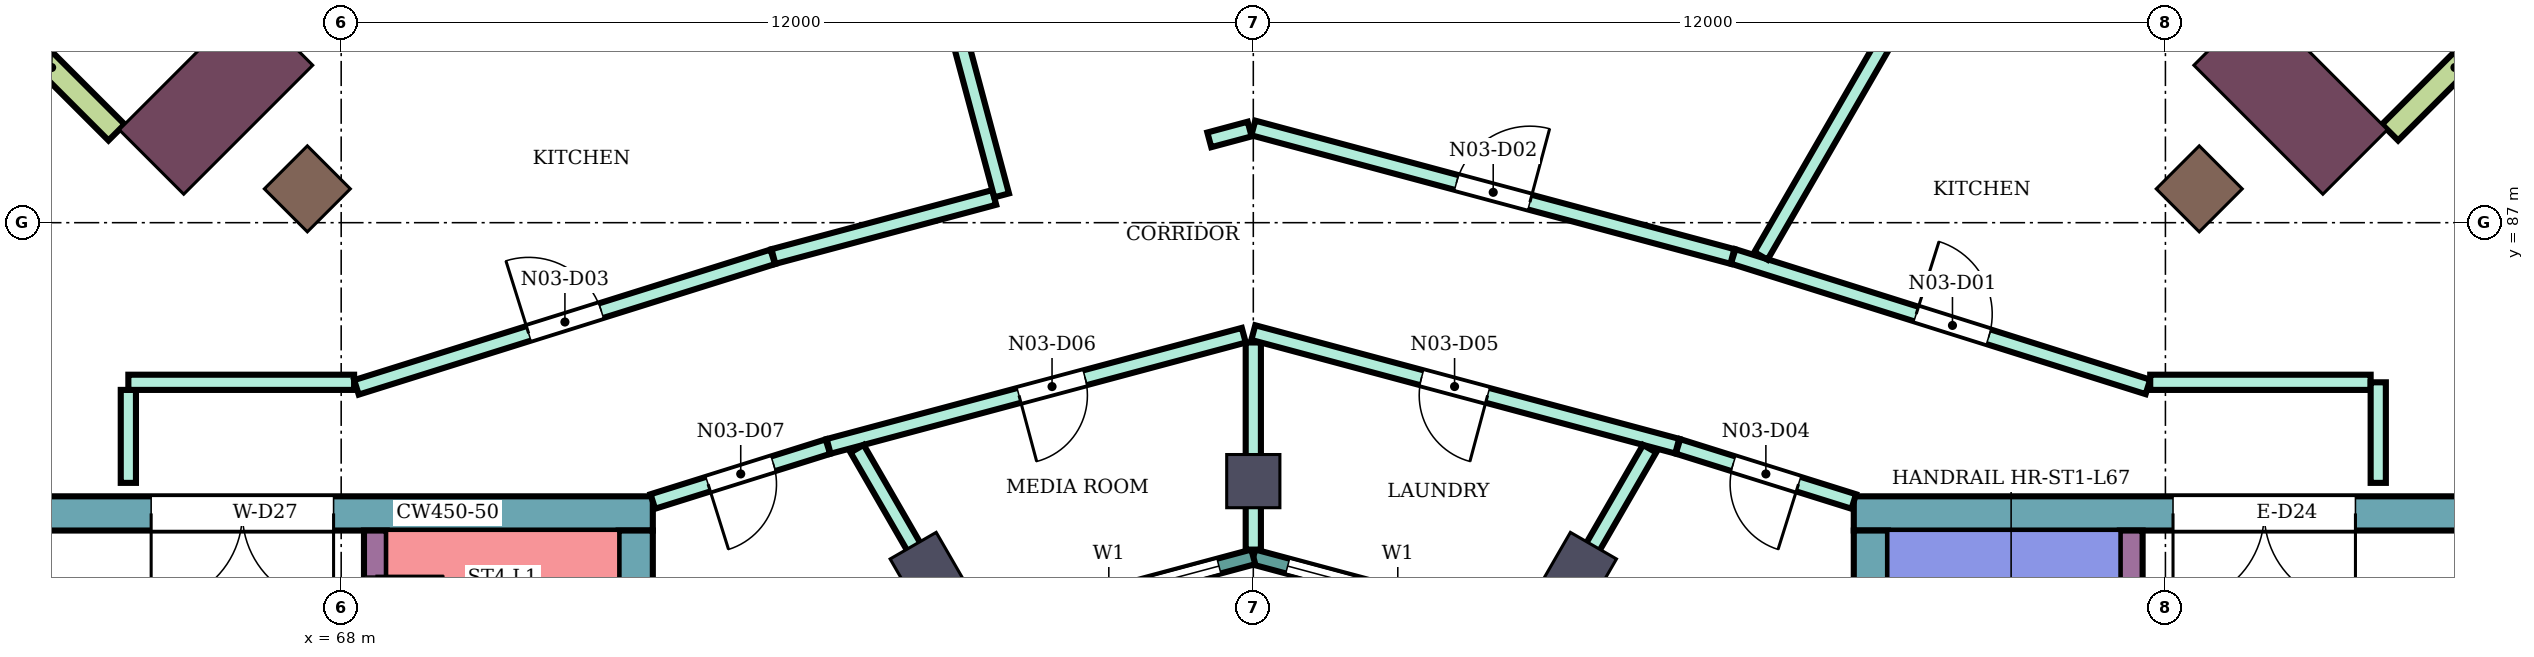
"""IFC4 building model, lengths in metres.
Left out: names, types, materials, properties, quantities, classifications, styles, units other than length and angle.
Written with IfcOpenShell. Run it as: python <this file> out.ifc"""

import sys

from ifc_helpers import new_model, si_unit, direction, frame, frame_2d, origin, origin_2d, place, context, subcontext, project, spatial, rectangle, extrude, element, fill, save


model = new_model("IFC4")
c1 = context("Model", 3, precision=1e-05, world=origin(), true_north=direction((0.0, 1.0)))
c2 = subcontext(c1, "Body", "Model", "MODEL_VIEW")
j1 = project(units=[si_unit("LENGTHUNIT", "METRE"), si_unit("PLANEANGLEUNIT", "RADIAN")], contexts=[c1])
p1 = place(None, origin())
s1 = spatial("IfcSite", under=j1, at=p1, CompositionType="ELEMENT")
p2 = place(p1, origin())
s2 = spatial("IfcBuilding", under=s1, at=p2, CompositionType="ELEMENT")
p3 = place(p2, frame((0.0, 0.0, 292.5)))
s3 = spatial("IfcBuildingStorey", under=s2, at=p3, CompositionType="ELEMENT", Elevation=292.5)
for number, where, z_axis, x_axis in (
    (1, (92.445, 87.445, 0.0), (0.0, 0.0, 1.0), (0.707, 0.707, 0.0)),
    (2, (67.555, 87.445, 0.0), (0.0, 0.0, 1.0), (-0.707, 0.707, 0.0)),
):
    element("IfcColumn", number, at=place(p3, frame(where, z_axis=z_axis, x_axis=x_axis)), inside=s3, PredefinedType="COLUMN", context=c2, shape_type="SweptSolid", body=[
        extrude(rectangle(XDim=0.8, YDim=0.8, at=origin_2d()), origin(), (0.0, 0.0, 1.0), 4.2),
    ])
for number, where, z_axis, x_axis in (
    (3, (84.3, 82.448, 0.0), (0.0, 0.0, 1.0), (0.5, 0.866, 0.0)),
    (4, (80.0, 83.6, 0.0), (0.0, 0.0, 1.0), (0.0, 1.0, 0.0)),
    (5, (75.7, 82.448, 0.0), (0.0, 0.0, 1.0), (-0.5, 0.866, 0.0)),
):
    element("IfcColumn", number, at=place(p3, frame(where, z_axis=z_axis, x_axis=x_axis)), inside=s3, PredefinedType="COLUMN", context=c2, shape_type="SweptSolid", body=[
        extrude(rectangle(XDim=0.7, YDim=0.7, at=origin_2d()), origin(), (0.0, 0.0, 1.0), 4.2),
    ])
for number, where, z_axis, x_axis in (
    (6, (93.647, 88.647, 0.0), (0.0, 0.0, 1.0), (0.707, 0.707, 0.0)),
    (7, (66.353, 88.647, 0.0), (0.0, 0.0, 1.0), (-0.707, 0.707, 0.0)),
):
    element("IfcColumn", number, at=place(p3, frame(where, z_axis=z_axis, x_axis=x_axis)), inside=s3, PredefinedType="COLUMN", context=c2, shape_type="SweptSolid", body=[
        extrude(rectangle(XDim=1.2, YDim=2.4, at=origin_2d()), origin(), (0.0, 0.0, 1.0), 4.2),
    ])
p4 = place(p3, frame((87.9, 83.175, 0.0), z_axis=(0.0, 0.0, 1.0), x_axis=(1.0, 0.0, 0.0)))
e8 = element("IfcWall", 8, at=p4, inside=s3, PredefinedType="SHEAR", context=c2, shape_type="SweptSolid", body=[
    extrude(rectangle(XDim=12.0, YDim=0.45, at=frame_2d((6.0, 0.0))), origin(), (0.0, 0.0, 1.0), 3.88),
])
p5 = place(p4, frame((4.2, 0.0, 0.0)))
e9 = element("IfcOpeningElement", 9, at=p5, cuts=e8, PredefinedType="OPENING", context=c2, shape_type="SweptSolid", body=[
    extrude(rectangle(XDim=2.4, YDim=2.4, at=frame_2d((1.2, 1.2))), frame((0.0, 0.235, 0.0), z_axis=(0.0, -1.0, 0.0), x_axis=(1.0, 0.0, 0.0)), (0.0, 0.0, 1.0), 0.47),
])
p6 = place(p3, frame((88.125, 75.0, 0.0), z_axis=(0.0, 0.0, 1.0), x_axis=(0.0, 1.0, 0.0)))
e10 = element("IfcWall", 10, at=p6, inside=s3, PredefinedType="SHEAR", context=c2, shape_type="SweptSolid", body=[
    extrude(rectangle(XDim=7.95, YDim=0.45, at=frame_2d((3.975, 0.0))), origin(), (0.0, 0.0, 1.0), 3.88),
])
p7 = place(p3, frame((91.55, 75.0, 0.0), z_axis=(0.0, 0.0, 1.0), x_axis=(0.0, 1.0, 0.0)))
e11 = element("IfcWall", 11, at=p7, inside=s3, PredefinedType="SHEAR", context=c2, shape_type="SweptSolid", body=[
    extrude(rectangle(XDim=7.95, YDim=0.3, at=frame_2d((3.975, 0.0))), origin(), (0.0, 0.0, 1.0), 3.88),
])
p8 = place(p7, frame((1.85, 0.0, 0.0)))
e12 = element("IfcOpeningElement", 12, at=p8, cuts=e11, PredefinedType="OPENING", context=c2, shape_type="SweptSolid", body=[
    extrude(rectangle(XDim=0.9, YDim=2.1, at=frame_2d((0.45, 1.05))), frame((0.0, 0.16, 0.0), z_axis=(0.0, -1.0, 0.0), x_axis=(1.0, 0.0, 0.0)), (0.0, 0.0, 1.0), 0.32),
])
p9 = place(p3, frame((72.1, 83.175, 0.0), z_axis=(0.0, 0.0, 1.0), x_axis=(-1.0, 0.0, 0.0)))
e13 = element("IfcWall", 13, at=p9, inside=s3, PredefinedType="SHEAR", context=c2, shape_type="SweptSolid", body=[
    extrude(rectangle(XDim=12.0, YDim=0.45, at=frame_2d((6.0, 0.0))), origin(), (0.0, 0.0, 1.0), 3.88),
])
p10 = place(p9, frame((4.2, 0.0, 0.0)))
e14 = element("IfcOpeningElement", 14, at=p10, cuts=e13, PredefinedType="OPENING", context=c2, shape_type="SweptSolid", body=[
    extrude(rectangle(XDim=2.4, YDim=2.4, at=frame_2d((1.2, 1.2))), frame((0.0, 0.235, 0.0), z_axis=(0.0, -1.0, 0.0), x_axis=(1.0, 0.0, 0.0)), (0.0, 0.0, 1.0), 0.47),
])
p11 = place(p3, frame((71.875, 82.95, 0.0), z_axis=(0.0, 0.0, 1.0), x_axis=(0.0, -1.0, 0.0)))
e15 = element("IfcWall", 15, at=p11, inside=s3, PredefinedType="SHEAR", context=c2, shape_type="SweptSolid", body=[
    extrude(rectangle(XDim=7.95, YDim=0.45, at=frame_2d((3.975, 0.0))), origin(), (0.0, 0.0, 1.0), 3.88),
])
p12 = place(p3, frame((68.45, 82.95, 0.0), z_axis=(0.0, 0.0, 1.0), x_axis=(0.0, -1.0, 0.0)))
e16 = element("IfcWall", 16, at=p12, inside=s3, PredefinedType="SHEAR", context=c2, shape_type="SweptSolid", body=[
    extrude(rectangle(XDim=7.95, YDim=0.3, at=frame_2d((3.975, 0.0))), origin(), (0.0, 0.0, 1.0), 3.88),
])
p13 = place(p12, frame((0.6, 0.0, 0.0)))
e17 = element("IfcOpeningElement", 17, at=p13, cuts=e16, PredefinedType="OPENING", context=c2, shape_type="SweptSolid", body=[
    extrude(rectangle(XDim=0.9, YDim=2.1, at=frame_2d((0.45, 1.05))), frame((0.0, 0.16, 0.0), z_axis=(0.0, -1.0, 0.0), x_axis=(1.0, 0.0, 0.0)), (0.0, 0.0, 1.0), 0.32),
])
for number, where, z_axis, x_axis in (
    (18, (94.955, 88.188, 0.0), (0.0, 0.0, 1.0), (0.707, 0.707, 0.0)),
    (19, (65.045, 88.188, 0.0), (0.0, 0.0, 1.0), (-0.707, 0.707, 0.0)),
):
    element("IfcWall", number, at=place(p3, frame(where, z_axis=z_axis, x_axis=x_axis)), inside=s3, PredefinedType="NOTDEFINED", context=c2, shape_type="SweptSolid", body=[
        extrude(rectangle(XDim=2.416, YDim=0.3, at=frame_2d((1.208, 0.0))), origin(), (0.0, 0.0, 1.0), 4.2),
    ])
p14 = place(p3, frame((83.802, 81.585, 0.0), z_axis=(0.0, 0.0, 1.0), x_axis=(-0.965933654434, 0.258789828301, 0.0)))
e20 = element("IfcWall", 20, at=p14, inside=s3, PredefinedType="NOTDEFINED", context=c2, shape_type="SweptSolid", body=[
    extrude(rectangle(XDim=3.936, YDim=0.2, at=frame_2d((1.968, 0.0))), origin(), (0.0, 0.0, 1.0), 4.2),
])
p15 = place(p14, frame((0.468, 0.0, 0.9)))
e21 = element("IfcOpeningElement", 21, at=p15, cuts=e20, PredefinedType="OPENING", context=c2, shape_type="SweptSolid", body=[
    extrude(rectangle(XDim=3.0, YDim=2.3, at=frame_2d((1.5, 1.15))), frame((0.0, 0.11, 0.0), z_axis=(0.0, -1.0, 0.0), x_axis=(1.0, 0.0, 0.0)), (0.0, 0.0, 1.0), 0.22),
])
p16 = place(p3, frame((80.0, 82.604, 0.0), z_axis=(0.0, 0.0, 1.0), x_axis=(-0.965933654434, -0.258789828301, 0.0)))
e22 = element("IfcWall", 22, at=p16, inside=s3, PredefinedType="NOTDEFINED", context=c2, shape_type="SweptSolid", body=[
    extrude(rectangle(XDim=3.936, YDim=0.2, at=frame_2d((1.968, 0.0))), origin(), (0.0, 0.0, 1.0), 4.2),
])
p17 = place(p16, frame((0.468, 0.0, 0.9)))
e23 = element("IfcOpeningElement", 23, at=p17, cuts=e22, PredefinedType="OPENING", context=c2, shape_type="SweptSolid", body=[
    extrude(rectangle(XDim=3.0, YDim=2.3, at=frame_2d((1.5, 1.15))), frame((0.0, 0.11, 0.0), z_axis=(0.0, -1.0, 0.0), x_axis=(1.0, 0.0, 0.0)), (0.0, 0.0, 1.0), 0.22),
])
p18 = place(p3, frame((65.2, 83.577, 0.0), z_axis=(0.0, 0.0, 1.0), x_axis=(0.0, 1.0, 0.0)))
e24 = element("IfcWall", 24, at=p18, inside=s3, PredefinedType="PARTITIONING", context=c2, shape_type="SweptSolid", body=[
    extrude(rectangle(XDim=1.223, YDim=0.2, at=frame_2d((0.612, 0.0))), origin(), (0.0, 0.0, 1.0), 3.75),
])
p19 = place(p3, frame((65.2, 84.9, 0.0), z_axis=(0.0, 0.0, 1.0), x_axis=(1.0, 0.0, 0.0)))
e25 = element("IfcWall", 25, at=p19, inside=s3, PredefinedType="PARTITIONING", context=c2, shape_type="SweptSolid", body=[
    extrude(rectangle(XDim=2.97, YDim=0.2, at=frame_2d((1.485, 0.0))), origin(), (0.0, 0.0, 1.0), 3.75),
])
p20 = place(p3, frame((68.201, 84.833, 0.0), z_axis=(0.0, 0.0, 1.0), x_axis=(0.95420102455, 0.299166182492, 0.0)))
e26 = element("IfcWall", 26, at=p20, inside=s3, PredefinedType="PARTITIONING", context=c2, shape_type="SweptSolid", body=[
    extrude(rectangle(XDim=5.74, YDim=0.2, at=frame_2d((2.87, 0.0))), origin(), (0.0, 0.0, 1.0), 3.75),
])
p21 = place(p20, frame((2.374, 0.0, 0.0)))
e27 = element("IfcOpeningElement", 27, at=p21, cuts=e26, PredefinedType="OPENING", context=c2, shape_type="SweptSolid", body=[
    extrude(rectangle(XDim=1.0, YDim=2.1, at=frame_2d((0.5, 1.05))), frame((0.0, 0.11, 0.0), z_axis=(0.0, -1.0, 0.0), x_axis=(1.0, 0.0, 0.0)), (0.0, 0.0, 1.0), 0.22),
])
p22 = place(p3, frame((72.1, 83.332, 0.0), z_axis=(0.0, 0.0, 1.0), x_axis=(0.954233106619, 0.299063836383, 0.0)))
e28 = element("IfcWall", 28, at=p22, inside=s3, PredefinedType="PARTITIONING", context=c2, shape_type="SweptSolid", body=[
    extrude(rectangle(XDim=2.414, YDim=0.2, at=frame_2d((1.207, 0.0))), origin(), (0.0, 0.0, 1.0), 3.75),
])
p23 = place(p22, frame((0.762, 0.0, 0.0)))
e29 = element("IfcOpeningElement", 29, at=p23, cuts=e28, PredefinedType="OPENING", context=c2, shape_type="SweptSolid", body=[
    extrude(rectangle(XDim=0.9, YDim=2.1, at=frame_2d((0.45, 1.05))), frame((0.0, 0.11, 0.0), z_axis=(0.0, -1.0, 0.0), x_axis=(1.0, 0.0, 0.0)), (0.0, 0.0, 1.0), 0.22),
])
p24 = place(p3, frame((73.687, 86.555, 0.0), z_axis=(0.0, 0.0, 1.0), x_axis=(0.965987897826, 0.258587279759, 0.0)))
e30 = element("IfcWall", 30, at=p24, inside=s3, PredefinedType="PARTITIONING", context=c2, shape_type="SweptSolid", body=[
    extrude(rectangle(XDim=3.007, YDim=0.2, at=frame_2d((1.503, 0.0))), origin(), (0.0, 0.0, 1.0), 3.75),
])
p25 = place(p3, frame((74.23, 96.538, 0.0), z_axis=(0.0, 0.0, 1.0), x_axis=(0.258775468547, -0.965937501538, 0.0)))
e31 = element("IfcWall", 31, at=p25, inside=s3, PredefinedType="PARTITIONING", context=c2, shape_type="SweptSolid", body=[
    extrude(rectangle(XDim=9.502, YDim=0.2, at=frame_2d((4.751, 0.0))), origin(), (0.0, 0.0, 1.0), 3.75),
])
p26 = place(p3, frame((74.413, 84.057, 0.0), z_axis=(0.0, 0.0, 1.0), x_axis=(0.965972135939, 0.258646153246, 0.0)))
e32 = element("IfcWall", 32, at=p26, inside=s3, PredefinedType="PARTITIONING", context=c2, shape_type="SweptSolid", body=[
    extrude(rectangle(XDim=5.654, YDim=0.2, at=frame_2d((2.827, 0.0))), origin(), (0.0, 0.0, 1.0), 3.75),
])
p27 = place(p26, frame((2.593, 0.0, 0.0)))
e33 = element("IfcOpeningElement", 33, at=p27, cuts=e32, PredefinedType="OPENING", context=c2, shape_type="SweptSolid", body=[
    extrude(rectangle(XDim=0.9, YDim=2.1, at=frame_2d((0.45, 1.05))), frame((0.0, 0.11, 0.0), z_axis=(0.0, -1.0, 0.0), x_axis=(1.0, 0.0, 0.0)), (0.0, 0.0, 1.0), 0.22),
])
p28 = place(p3, frame((74.787, 84.027, 0.0), z_axis=(0.0, 0.0, 1.0), x_axis=(0.500079107518, -0.86597972622, 0.0)))
e34 = element("IfcWall", 34, at=p28, inside=s3, PredefinedType="PARTITIONING", context=c2, shape_type="SweptSolid", body=[
    extrude(rectangle(XDim=2.726, YDim=0.2, at=frame_2d((1.363, 0.0))), origin(), (0.0, 0.0, 1.0), 3.75),
])
p29 = place(p3, frame((79.421, 88.09, 0.0), z_axis=(0.0, 0.0, 1.0), x_axis=(0.966065016104, 0.258299021793, 0.0)))
e35 = element("IfcWall", 35, at=p29, inside=s3, PredefinedType="PARTITIONING", context=c2, shape_type="SweptSolid", body=[
    extrude(rectangle(XDim=0.549, YDim=0.2, at=frame_2d((0.274, 0.0))), origin(), (0.0, 0.0, 1.0), 3.75),
])
p30 = place(p3, frame((80.0, 82.699, 0.0), z_axis=(0.0, 0.0, 1.0), x_axis=(0.0, 1.0, 0.0)))
e36 = element("IfcWall", 36, at=p30, inside=s3, PredefinedType="PARTITIONING", context=c2, shape_type="SweptSolid", body=[
    extrude(rectangle(XDim=2.725, YDim=0.2, at=frame_2d((1.363, 0.0))), origin(), (0.0, 0.0, 1.0), 3.75),
])
p31 = place(p3, frame((80.0, 85.554, 0.0), z_axis=(0.0, 0.0, 1.0), x_axis=(0.965928989968, -0.258807237802, 0.0)))
e37 = element("IfcWall", 37, at=p31, inside=s3, PredefinedType="PARTITIONING", context=c2, shape_type="SweptSolid", body=[
    extrude(rectangle(XDim=5.774, YDim=0.2, at=frame_2d((2.887, 0.0))), origin(), (0.0, 0.0, 1.0), 3.75),
])
p32 = place(p31, frame((2.292, 0.0, 0.0)))
e38 = element("IfcOpeningElement", 38, at=p32, cuts=e37, PredefinedType="OPENING", context=c2, shape_type="SweptSolid", body=[
    extrude(rectangle(XDim=0.9, YDim=2.1, at=frame_2d((0.45, 1.05))), frame((0.0, 0.11, 0.0), z_axis=(0.0, -1.0, 0.0), x_axis=(1.0, 0.0, 0.0)), (0.0, 0.0, 1.0), 0.22),
])
p33 = place(p3, frame((80.0, 88.246, 0.0), z_axis=(0.0, 0.0, 1.0), x_axis=(0.965856994925, -0.259075790752, 0.0)))
e39 = element("IfcWall", 39, at=p33, inside=s3, PredefinedType="PARTITIONING", context=c2, shape_type="SweptSolid", body=[
    extrude(rectangle(XDim=6.526, YDim=0.2, at=frame_2d((3.263, 0.0))), origin(), (0.0, 0.0, 1.0), 3.75),
])
p34 = place(p33, frame((2.768, 0.0, 0.0)))
e40 = element("IfcOpeningElement", 40, at=p34, cuts=e39, PredefinedType="OPENING", context=c2, shape_type="SweptSolid", body=[
    extrude(rectangle(XDim=1.0, YDim=2.1, at=frame_2d((0.5, 1.05))), frame((0.0, 0.11, 0.0), z_axis=(0.0, -1.0, 0.0), x_axis=(1.0, 0.0, 0.0)), (0.0, 0.0, 1.0), 0.22),
])
p35 = place(p3, frame((83.851, 81.666, 0.0), z_axis=(0.0, 0.0, 1.0), x_axis=(0.500146274735, 0.865940935554, 0.0)))
e41 = element("IfcWall", 41, at=p35, inside=s3, PredefinedType="PARTITIONING", context=c2, shape_type="SweptSolid", body=[
    extrude(rectangle(XDim=2.726, YDim=0.2, at=frame_2d((1.363, 0.0))), origin(), (0.0, 0.0, 1.0), 3.75),
])
p36 = place(p3, frame((85.587, 84.057, 0.0), z_axis=(0.0, 0.0, 1.0), x_axis=(0.954239513179, -0.299043393987, 0.0)))
e42 = element("IfcWall", 42, at=p36, inside=s3, PredefinedType="PARTITIONING", context=c2, shape_type="SweptSolid", body=[
    extrude(rectangle(XDim=2.424, YDim=0.2, at=frame_2d((1.212, 0.0))), origin(), (0.0, 0.0, 1.0), 3.75),
])
p37 = place(p36, frame((0.762, 0.0, 0.0)))
e43 = element("IfcOpeningElement", 43, at=p37, cuts=e42, PredefinedType="OPENING", context=c2, shape_type="SweptSolid", body=[
    extrude(rectangle(XDim=0.9, YDim=2.1, at=frame_2d((0.45, 1.05))), frame((0.0, 0.11, 0.0), z_axis=(0.0, -1.0, 0.0), x_axis=(1.0, 0.0, 0.0)), (0.0, 0.0, 1.0), 0.22),
])
p38 = place(p3, frame((86.314, 86.556, 0.0), z_axis=(0.0, 0.0, 1.0), x_axis=(0.953912400139, -0.300085209334, 0.0)))
e44 = element("IfcWall", 44, at=p38, inside=s3, PredefinedType="PARTITIONING", context=c2, shape_type="SweptSolid", body=[
    extrude(rectangle(XDim=5.719, YDim=0.2, at=frame_2d((2.86, 0.0))), origin(), (0.0, 0.0, 1.0), 3.75),
])
p39 = place(p38, frame((2.524, 0.0, 0.0)))
e45 = element("IfcOpeningElement", 45, at=p39, cuts=e44, PredefinedType="OPENING", context=c2, shape_type="SweptSolid", body=[
    extrude(rectangle(XDim=1.0, YDim=2.1, at=frame_2d((0.5, 1.05))), frame((0.0, 0.11, 0.0), z_axis=(0.0, -1.0, 0.0), x_axis=(1.0, 0.0, 0.0)), (0.0, 0.0, 1.0), 0.22),
])
p40 = place(p3, frame((86.679, 86.563, 0.0), z_axis=(0.0, 0.0, 1.0), x_axis=(0.500152516677, 0.865937330331, 0.0)))
e46 = element("IfcWall", 46, at=p40, inside=s3, PredefinedType="PARTITIONING", context=c2, shape_type="SweptSolid", body=[
    extrude(rectangle(XDim=8.943, YDim=0.2, at=frame_2d((4.472, 0.0))), origin(), (0.0, 0.0, 1.0), 3.75),
])
p41 = place(p3, frame((91.8, 84.9, 0.0), z_axis=(0.0, 0.0, 1.0), x_axis=(1.0, 0.0, 0.0)))
e47 = element("IfcWall", 47, at=p41, inside=s3, PredefinedType="PARTITIONING", context=c2, shape_type="SweptSolid", body=[
    extrude(rectangle(XDim=2.9, YDim=0.2, at=frame_2d((1.45, 0.0))), origin(), (0.0, 0.0, 1.0), 3.75),
])
p42 = place(p3, frame((94.8, 83.577, 0.0), z_axis=(0.0, 0.0, 1.0), x_axis=(0.0, 1.0, 0.0)))
e48 = element("IfcWall", 48, at=p42, inside=s3, PredefinedType="PARTITIONING", context=c2, shape_type="SweptSolid", body=[
    extrude(rectangle(XDim=1.323, YDim=0.2, at=frame_2d((0.662, 0.0))), origin(), (0.0, 0.0, 1.0), 3.75),
])
p43 = place(p15, origin())
e49 = element("IfcWindow", 49, at=p43, inside=s3, PartitioningType="SINGLE_PANEL", PredefinedType="WINDOW", context=c2, shape_type="SweptSolid", body=[
    extrude(rectangle(XDim=3.0, YDim=2.3, at=frame_2d((1.5, 1.15))), frame((0.0, 0.03, 0.0), z_axis=(0.0, -1.0, 0.0), x_axis=(1.0, 0.0, 0.0)), (0.0, 0.0, 1.0), 0.06),
])
fill(e21, e49)
p44 = place(p17, origin())
e50 = element("IfcWindow", 50, at=p44, inside=s3, PartitioningType="SINGLE_PANEL", PredefinedType="WINDOW", context=c2, shape_type="SweptSolid", body=[
    extrude(rectangle(XDim=3.0, YDim=2.3, at=frame_2d((1.5, 1.15))), frame((0.0, 0.03, 0.0), z_axis=(0.0, -1.0, 0.0), x_axis=(1.0, 0.0, 0.0)), (0.0, 0.0, 1.0), 0.06),
])
fill(e23, e50)
p45 = place(p39, origin())
e51 = element("IfcDoor", 51, at=p45, inside=s3, OperationType="SINGLE_SWING_LEFT", PredefinedType="DOOR", context=c2, shape_type="SweptSolid", body=[
    extrude(rectangle(XDim=1.0, YDim=2.1, at=frame_2d((0.5, 1.05))), frame((0.0, 0.025, 0.0), z_axis=(0.0, -1.0, 0.0), x_axis=(1.0, 0.0, 0.0)), (0.0, 0.0, 1.0), 0.05),
])
fill(e45, e51)
p46 = place(p34, origin())
e52 = element("IfcDoor", 52, at=p46, inside=s3, OperationType="SINGLE_SWING_RIGHT", PredefinedType="DOOR", context=c2, shape_type="SweptSolid", body=[
    extrude(rectangle(XDim=1.0, YDim=2.1, at=frame_2d((0.5, 1.05))), frame((0.0, 0.025, 0.0), z_axis=(0.0, -1.0, 0.0), x_axis=(1.0, 0.0, 0.0)), (0.0, 0.0, 1.0), 0.05),
])
fill(e40, e52)
p47 = place(p21, origin())
e53 = element("IfcDoor", 53, at=p47, inside=s3, OperationType="SINGLE_SWING_LEFT", PredefinedType="DOOR", context=c2, shape_type="SweptSolid", body=[
    extrude(rectangle(XDim=1.0, YDim=2.1, at=frame_2d((0.5, 1.05))), frame((0.0, 0.025, 0.0), z_axis=(0.0, -1.0, 0.0), x_axis=(1.0, 0.0, 0.0)), (0.0, 0.0, 1.0), 0.05),
])
fill(e27, e53)
p48 = place(p37, frame((0.9, 0.0, 0.0), z_axis=(0.0, 0.0, 1.0), x_axis=(-1.0, 0.0, 0.0)))
e54 = element("IfcDoor", 54, at=p48, inside=s3, OperationType="SINGLE_SWING_LEFT", PredefinedType="DOOR", context=c2, shape_type="SweptSolid", body=[
    extrude(rectangle(XDim=0.9, YDim=2.1, at=frame_2d((0.45, 1.05))), frame((0.0, 0.025, 0.0), z_axis=(0.0, -1.0, 0.0), x_axis=(1.0, 0.0, 0.0)), (0.0, 0.0, 1.0), 0.05),
])
fill(e43, e54)
p49 = place(p32, frame((0.9, 0.0, 0.0), z_axis=(0.0, 0.0, 1.0), x_axis=(-1.0, 0.0, 0.0)))
e55 = element("IfcDoor", 55, at=p49, inside=s3, OperationType="SINGLE_SWING_LEFT", PredefinedType="DOOR", context=c2, shape_type="SweptSolid", body=[
    extrude(rectangle(XDim=0.9, YDim=2.1, at=frame_2d((0.45, 1.05))), frame((0.0, 0.025, 0.0), z_axis=(0.0, -1.0, 0.0), x_axis=(1.0, 0.0, 0.0)), (0.0, 0.0, 1.0), 0.05),
])
fill(e38, e55)
p50 = place(p27, frame((0.9, 0.0, 0.0), z_axis=(0.0, 0.0, 1.0), x_axis=(-1.0, 0.0, 0.0)))
e56 = element("IfcDoor", 56, at=p50, inside=s3, OperationType="SINGLE_SWING_RIGHT", PredefinedType="DOOR", context=c2, shape_type="SweptSolid", body=[
    extrude(rectangle(XDim=0.9, YDim=2.1, at=frame_2d((0.45, 1.05))), frame((0.0, 0.025, 0.0), z_axis=(0.0, -1.0, 0.0), x_axis=(1.0, 0.0, 0.0)), (0.0, 0.0, 1.0), 0.05),
])
fill(e33, e56)
p51 = place(p23, frame((0.9, 0.0, 0.0), z_axis=(0.0, 0.0, 1.0), x_axis=(-1.0, 0.0, 0.0)))
e57 = element("IfcDoor", 57, at=p51, inside=s3, OperationType="SINGLE_SWING_RIGHT", PredefinedType="DOOR", context=c2, shape_type="SweptSolid", body=[
    extrude(rectangle(XDim=0.9, YDim=2.1, at=frame_2d((0.45, 1.05))), frame((0.0, 0.025, 0.0), z_axis=(0.0, -1.0, 0.0), x_axis=(1.0, 0.0, 0.0)), (0.0, 0.0, 1.0), 0.05),
])
fill(e29, e57)
p52 = place(p5, frame((2.4, 0.0, 0.0), z_axis=(0.0, 0.0, 1.0), x_axis=(-1.0, 0.0, 0.0)))
e58 = element("IfcDoor", 58, at=p52, inside=s3, OperationType="DOUBLE_DOOR_SINGLE_SWING", PredefinedType="DOOR", context=c2, shape_type="SweptSolid", body=[
    extrude(rectangle(XDim=2.4, YDim=2.4, at=frame_2d((1.2, 1.2))), frame((0.0, 0.025, 0.0), z_axis=(0.0, -1.0, 0.0), x_axis=(1.0, 0.0, 0.0)), (0.0, 0.0, 1.0), 0.05),
])
fill(e9, e58)
p53 = place(p13, origin())
e59 = element("IfcDoor", 59, at=p53, inside=s3, OperationType="SINGLE_SWING_LEFT", PredefinedType="DOOR", context=c2, shape_type="SweptSolid", body=[
    extrude(rectangle(XDim=0.9, YDim=2.1, at=frame_2d((0.45, 1.05))), frame((0.0, 0.025, 0.0), z_axis=(0.0, -1.0, 0.0), x_axis=(1.0, 0.0, 0.0)), (0.0, 0.0, 1.0), 0.05),
])
fill(e17, e59)
p54 = place(p10, origin())
e60 = element("IfcDoor", 60, at=p54, inside=s3, OperationType="DOUBLE_DOOR_SINGLE_SWING", PredefinedType="DOOR", context=c2, shape_type="SweptSolid", body=[
    extrude(rectangle(XDim=2.4, YDim=2.4, at=frame_2d((1.2, 1.2))), frame((0.0, 0.025, 0.0), z_axis=(0.0, -1.0, 0.0), x_axis=(1.0, 0.0, 0.0)), (0.0, 0.0, 1.0), 0.05),
])
fill(e14, e60)
save(model, sys.argv[1])
